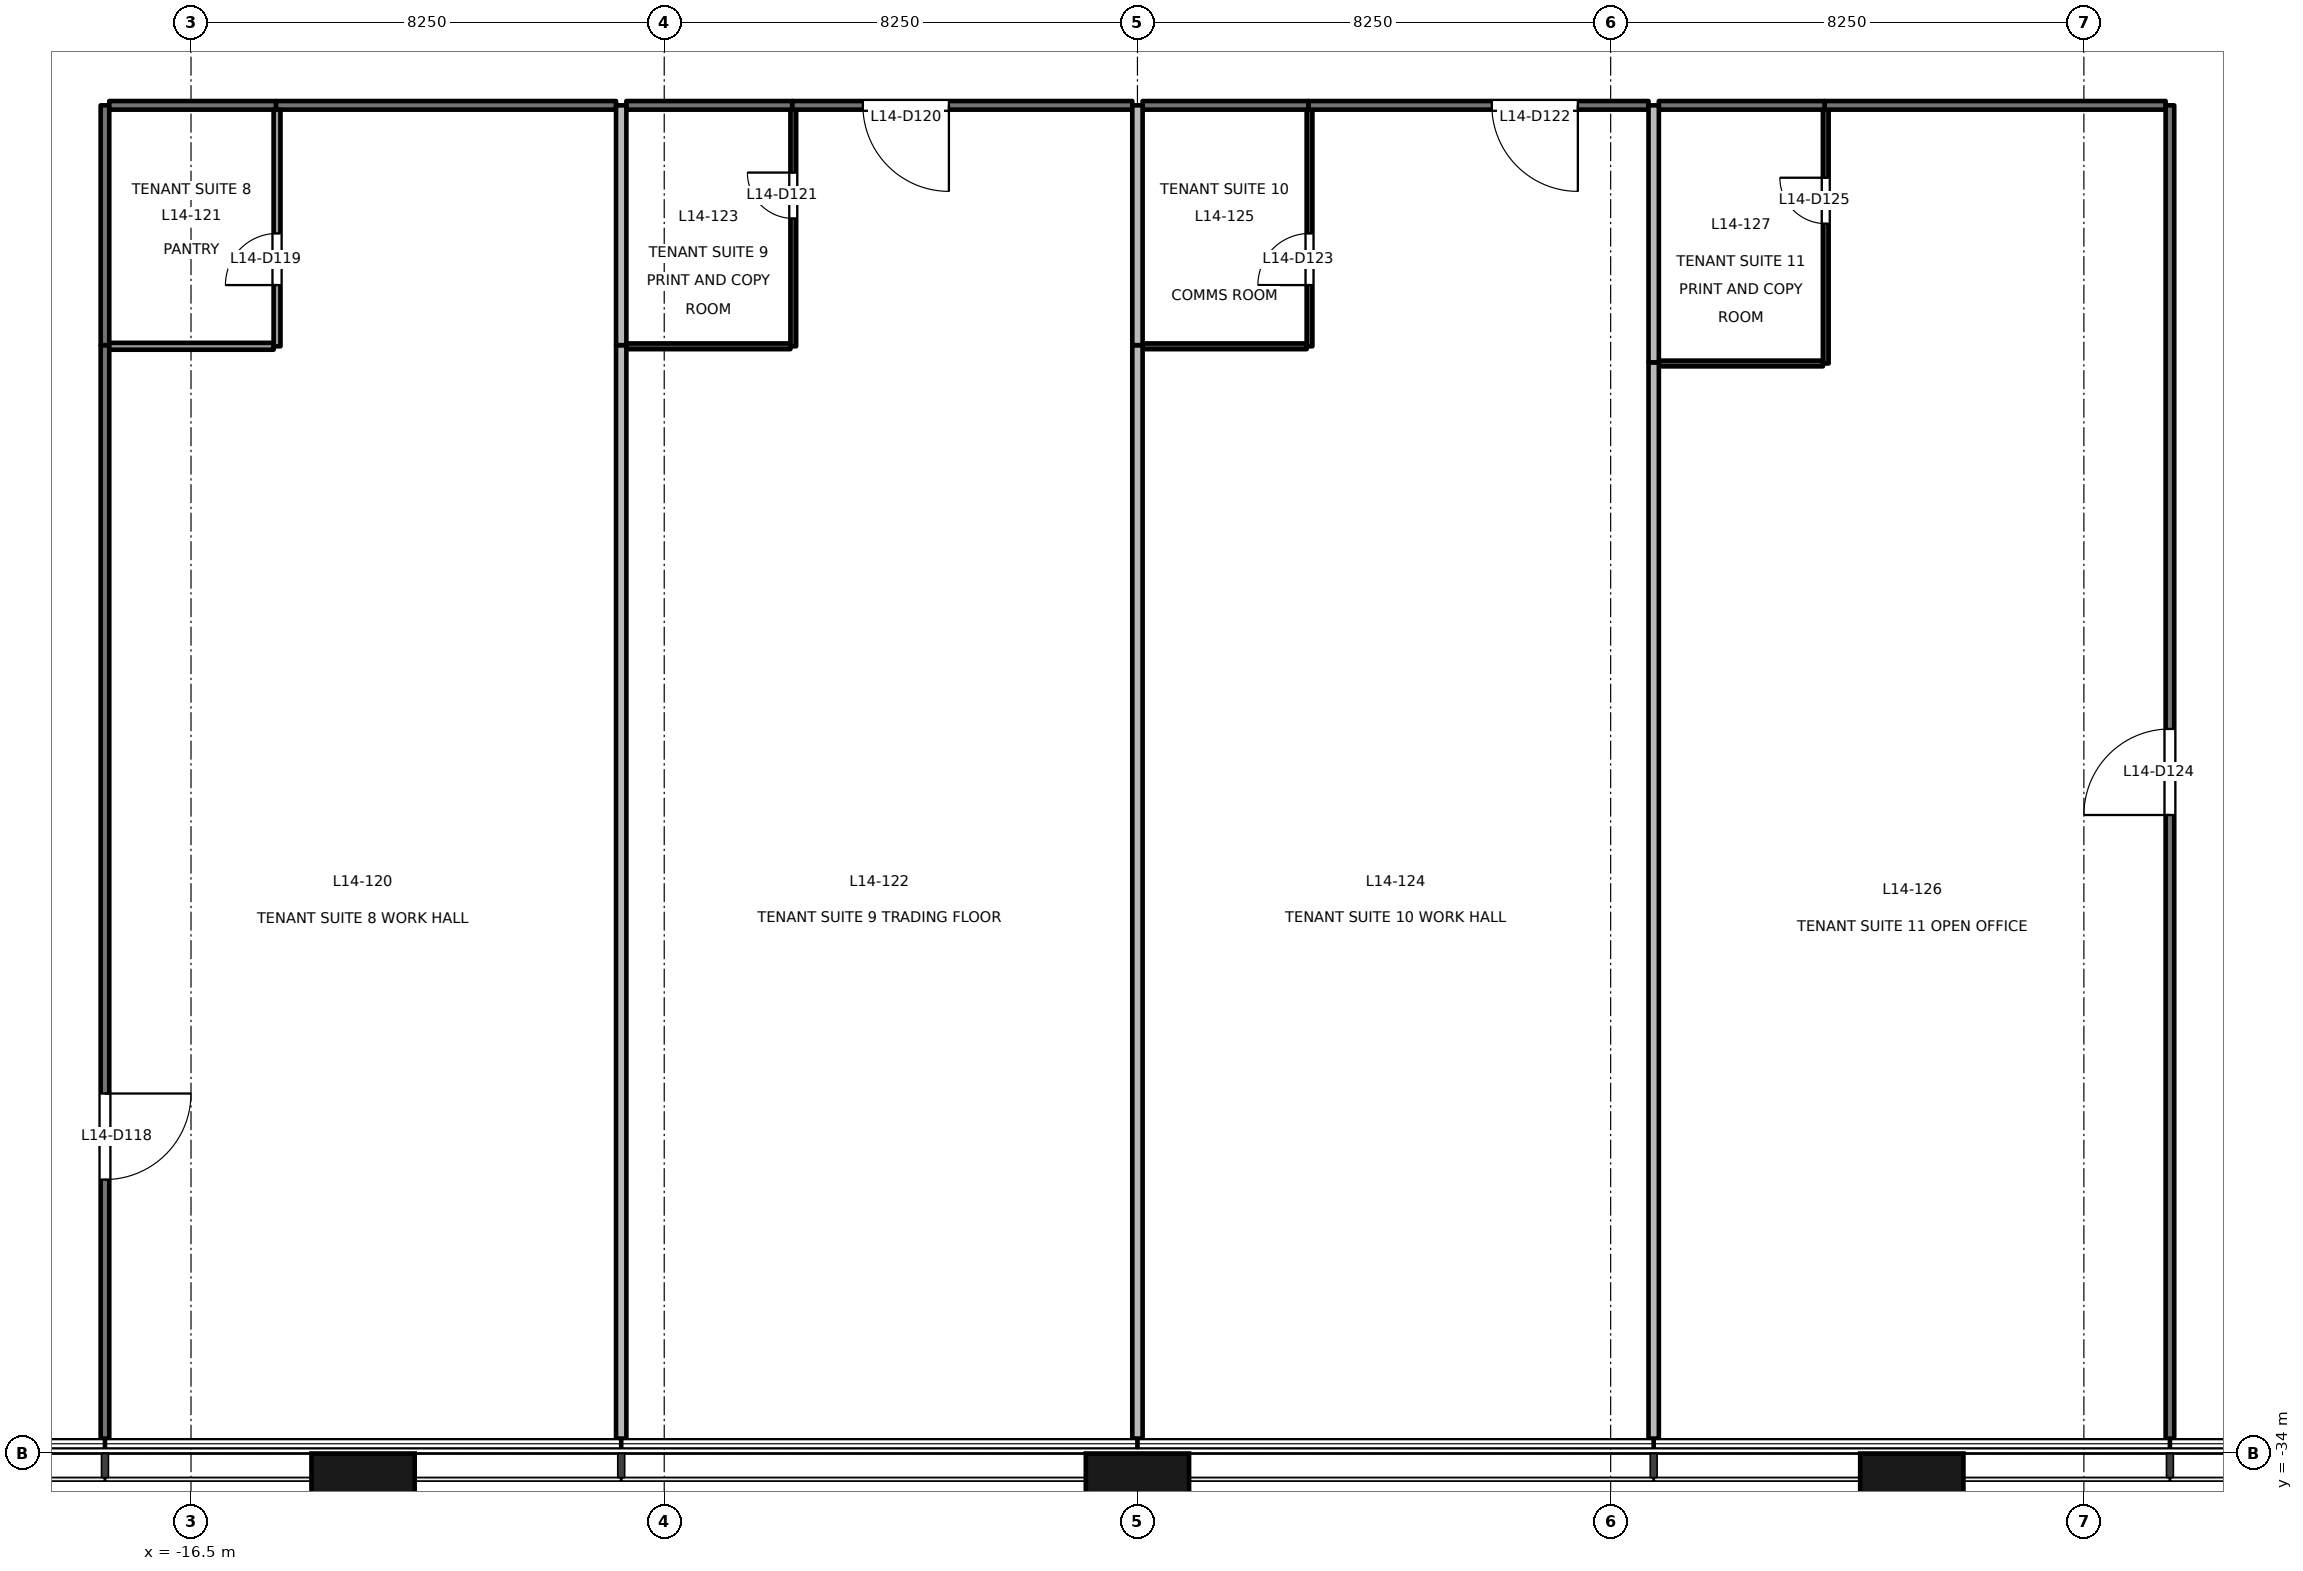
"""IFC4 building model, lengths in metres.
Left out: names, types, materials, properties, quantities, classifications, styles, units other than length and angle.
Written with IfcOpenShell. Run it as: python <this file> out.ifc"""

import sys

from ifc_helpers import new_model, si_unit, direction, frame, frame_2d, origin, origin_2d, place, context, subcontext, project, spatial, rectangle, extrude, element, fill, save


model = new_model("IFC4")
c1 = context("Model", 3, precision=1e-05, world=origin(), true_north=direction((0.0, 1.0)))
c2 = subcontext(c1, "Body", "Model", "MODEL_VIEW")
j1 = project(units=[si_unit("LENGTHUNIT", "METRE"), si_unit("PLANEANGLEUNIT", "RADIAN")], contexts=[c1])
p1 = place(None, origin())
s1 = spatial("IfcSite", under=j1, at=p1, CompositionType="ELEMENT")
p2 = place(p1, origin())
s2 = spatial("IfcBuilding", under=s1, at=p2, CompositionType="ELEMENT")
p3 = place(p2, frame((0.0, 0.0, 65.2)))
s3 = spatial("IfcBuildingStorey", under=s2, at=p3, CompositionType="ELEMENT", Elevation=65.2)
for number, where, z_axis, x_axis in (
    (1, (-13.5, -34.9, -0.2), (0.0, 0.0, 1.0), (1.0, 0.0, 0.0)),
    (2, (0.0, -34.9, -0.2), (0.0, 0.0, 1.0), (1.0, 0.0, 0.0)),
    (3, (13.5, -34.9, -0.2), (0.0, 0.0, 1.0), (1.0, 0.0, 0.0)),
):
    element("IfcColumn", number, at=place(p3, frame(where, z_axis=z_axis, x_axis=x_axis)), inside=s3, PredefinedType="COLUMN", context=c2, shape_type="SweptSolid", body=[
        extrude(rectangle(XDim=1.8, YDim=1.8, at=origin_2d()), origin(), (0.0, 0.0, 1.0), 4.1),
    ])
p4 = place(p3, frame((-18.0, -14.68, 0.0), z_axis=(0.0, 0.0, 1.0), x_axis=(0.0, -1.0, 0.0)))
e4 = element("IfcWall", 4, at=p4, inside=s3, PredefinedType="PARTITIONING", context=c2, shape_type="SweptSolid", body=[
    extrude(rectangle(XDim=19.06, YDim=0.15, at=frame_2d((9.53, 0.0))), origin(), (0.0, 0.0, 1.0), 2.5),
])
p5 = place(p4, frame((13.045, 0.0, 0.0)))
e5 = element("IfcOpeningElement", 5, at=p5, cuts=e4, PredefinedType="OPENING", context=c2, shape_type="SweptSolid", body=[
    extrude(rectangle(XDim=1.5, YDim=2.1, at=frame_2d((0.75, 1.05))), frame((0.0, 0.085, 0.0), z_axis=(0.0, -1.0, 0.0), x_axis=(1.0, 0.0, 0.0)), (0.0, 0.0, 1.0), 0.171),
])
p6 = place(p3, frame((-9.09, -10.5, 0.0), z_axis=(0.0, 0.0, 1.0), x_axis=(-1.0, 0.0, 0.0)))
e6 = element("IfcWall", 6, at=p6, inside=s3, PredefinedType="PARTITIONING", context=c2, shape_type="SweptSolid", body=[
    extrude(rectangle(XDim=5.93, YDim=0.15, at=frame_2d((2.965, 0.0))), origin(), (0.0, 0.0, 1.0), 2.9),
])
p7 = place(p3, frame((-18.0, -10.5, 0.0), z_axis=(0.0, 0.0, 1.0), x_axis=(0.0, -1.0, 0.0)))
e7 = element("IfcWall", 7, at=p7, inside=s3, PredefinedType="PARTITIONING", context=c2, shape_type="SweptSolid", body=[
    extrude(rectangle(XDim=4.18, YDim=0.15, at=frame_2d((2.09, 0.0))), origin(), (0.0, 0.0, 1.0), 2.5),
])
p8 = place(p3, frame((-15.02, -10.5, 0.0), z_axis=(0.0, 0.0, 1.0), x_axis=(-1.0, 0.0, 0.0)))
e8 = element("IfcWall", 8, at=p8, inside=s3, PredefinedType="PARTITIONING", context=c2, shape_type="SweptSolid", body=[
    extrude(rectangle(XDim=2.905, YDim=0.15, at=frame_2d((1.453, 0.0))), origin(), (0.0, 0.0, 1.0), 2.5),
])
p9 = place(p3, frame((-0.09, -10.5, 0.0), z_axis=(0.0, 0.0, 1.0), x_axis=(-1.0, 0.0, 0.0)))
e9 = element("IfcWall", 9, at=p9, inside=s3, PredefinedType="PARTITIONING", context=c2, shape_type="SweptSolid", body=[
    extrude(rectangle(XDim=5.93, YDim=0.15, at=frame_2d((2.965, 0.0))), origin(), (0.0, 0.0, 1.0), 2.9),
])
p10 = place(p9, frame((3.197, 0.0, 0.0)))
e10 = element("IfcOpeningElement", 10, at=p10, cuts=e9, PredefinedType="OPENING", context=c2, shape_type="SweptSolid", body=[
    extrude(rectangle(XDim=1.5, YDim=2.1, at=frame_2d((0.75, 1.05))), frame((0.0, 0.085, 0.0), z_axis=(0.0, -1.0, 0.0), x_axis=(1.0, 0.0, 0.0)), (0.0, 0.0, 1.0), 0.171),
])
p11 = place(p3, frame((-6.02, -10.5, 0.0), z_axis=(0.0, 0.0, 1.0), x_axis=(-1.0, 0.0, 0.0)))
e11 = element("IfcWall", 11, at=p11, inside=s3, PredefinedType="PARTITIONING", context=c2, shape_type="SweptSolid", body=[
    extrude(rectangle(XDim=2.89, YDim=0.15, at=frame_2d((1.445, 0.0))), origin(), (0.0, 0.0, 1.0), 2.9),
])
p12 = place(p3, frame((8.91, -10.5, 0.0), z_axis=(0.0, 0.0, 1.0), x_axis=(-1.0, 0.0, 0.0)))
e12 = element("IfcWall", 12, at=p12, inside=s3, PredefinedType="PARTITIONING", context=c2, shape_type="SweptSolid", body=[
    extrude(rectangle(XDim=5.93, YDim=0.15, at=frame_2d((2.965, 0.0))), origin(), (0.0, 0.0, 1.0), 2.9),
])
p13 = place(p12, frame((1.232, 0.0, 0.0)))
e13 = element("IfcOpeningElement", 13, at=p13, cuts=e12, PredefinedType="OPENING", context=c2, shape_type="SweptSolid", body=[
    extrude(rectangle(XDim=1.5, YDim=2.1, at=frame_2d((0.75, 1.05))), frame((0.0, 0.085, 0.0), z_axis=(0.0, -1.0, 0.0), x_axis=(1.0, 0.0, 0.0)), (0.0, 0.0, 1.0), 0.171),
])
p14 = place(p3, frame((2.98, -10.5, 0.0), z_axis=(0.0, 0.0, 1.0), x_axis=(-1.0, 0.0, 0.0)))
e14 = element("IfcWall", 14, at=p14, inside=s3, PredefinedType="PARTITIONING", context=c2, shape_type="SweptSolid", body=[
    extrude(rectangle(XDim=2.89, YDim=0.15, at=frame_2d((1.445, 0.0))), origin(), (0.0, 0.0, 1.0), 2.9),
])
p15 = place(p3, frame((17.925, -10.5, 0.0), z_axis=(0.0, 0.0, 1.0), x_axis=(-1.0, 0.0, 0.0)))
e15 = element("IfcWall", 15, at=p15, inside=s3, PredefinedType="PARTITIONING", context=c2, shape_type="SweptSolid", body=[
    extrude(rectangle(XDim=5.945, YDim=0.15, at=frame_2d((2.973, 0.0))), origin(), (0.0, 0.0, 1.0), 2.5),
])
p16 = place(p3, frame((18.0, -33.74, 0.0), z_axis=(0.0, 0.0, 1.0), x_axis=(0.0, 1.0, 0.0)))
e16 = element("IfcWall", 16, at=p16, inside=s3, PredefinedType="PARTITIONING", context=c2, shape_type="SweptSolid", body=[
    extrude(rectangle(XDim=23.24, YDim=0.15, at=frame_2d((11.62, 0.0))), origin(), (0.0, 0.0, 1.0), 2.5),
])
p17 = place(p16, frame((10.87, 0.0, 0.0)))
e17 = element("IfcOpeningElement", 17, at=p17, cuts=e16, PredefinedType="OPENING", context=c2, shape_type="SweptSolid", body=[
    extrude(rectangle(XDim=1.5, YDim=2.1, at=frame_2d((0.75, 1.05))), frame((0.0, 0.085, 0.0), z_axis=(0.0, -1.0, 0.0), x_axis=(1.0, 0.0, 0.0)), (0.0, 0.0, 1.0), 0.171),
])
p18 = place(p3, frame((11.98, -10.5, 0.0), z_axis=(0.0, 0.0, 1.0), x_axis=(-1.0, 0.0, 0.0)))
e18 = element("IfcWall", 18, at=p18, inside=s3, PredefinedType="PARTITIONING", context=c2, shape_type="SweptSolid", body=[
    extrude(rectangle(XDim=2.89, YDim=0.15, at=frame_2d((1.445, 0.0))), origin(), (0.0, 0.0, 1.0), 2.9),
])
p19 = place(p3, frame((-17.925, -14.7, 0.0), z_axis=(0.0, 0.0, 1.0), x_axis=(1.0, 0.0, 0.0)))
e19 = element("IfcWall", 19, at=p19, inside=s3, PredefinedType="PARTITIONING", context=c2, shape_type="SweptSolid", body=[
    extrude(rectangle(XDim=2.865, YDim=0.12, at=frame_2d((1.433, 0.0))), origin(), (0.0, 0.0, 1.0), 2.5),
])
p20 = place(p3, frame((-15.0, -14.7, 0.0), z_axis=(0.0, 0.0, 1.0), x_axis=(0.0, 1.0, 0.0)))
e20 = element("IfcWall", 20, at=p20, inside=s3, PredefinedType="PARTITIONING", context=c2, shape_type="SweptSolid", body=[
    extrude(rectangle(XDim=4.125, YDim=0.12, at=frame_2d((2.062, 0.0))), origin(), (0.0, 0.0, 1.0), 3.9),
])
p21 = place(p20, frame((1.067, 0.0, 0.0)))
e21 = element("IfcOpeningElement", 21, at=p21, cuts=e20, PredefinedType="OPENING", context=c2, shape_type="SweptSolid", body=[
    extrude(rectangle(XDim=0.9, YDim=2.1, at=frame_2d((0.45, 1.05))), frame((0.0, 0.071, 0.0), z_axis=(0.0, -1.0, 0.0), x_axis=(1.0, 0.0, 0.0)), (0.0, 0.0, 1.0), 0.141),
])
p22 = place(p3, frame((-9.0, -14.68, 0.0), z_axis=(0.0, 0.0, 1.0), x_axis=(0.0, -1.0, 0.0)))
e22 = element("IfcWall", 22, at=p22, inside=s3, PredefinedType="PARTITIONING", context=c2, shape_type="SweptSolid", body=[
    extrude(rectangle(XDim=19.06, YDim=0.18, at=frame_2d((9.53, 0.0))), origin(), (0.0, 0.0, 1.0), 2.9),
])
p23 = place(p3, frame((-9.0, -10.5, 0.0), z_axis=(0.0, 0.0, 1.0), x_axis=(0.0, -1.0, 0.0)))
e23 = element("IfcWall", 23, at=p23, inside=s3, PredefinedType="PARTITIONING", context=c2, shape_type="SweptSolid", body=[
    extrude(rectangle(XDim=4.18, YDim=0.18, at=frame_2d((2.09, 0.0))), origin(), (0.0, 0.0, 1.0), 2.9),
])
p24 = place(p3, frame((-8.91, -14.7, 0.0), z_axis=(0.0, 0.0, 1.0), x_axis=(1.0, 0.0, 0.0)))
e24 = element("IfcWall", 24, at=p24, inside=s3, PredefinedType="PARTITIONING", context=c2, shape_type="SweptSolid", body=[
    extrude(rectangle(XDim=2.86, YDim=0.1, at=frame_2d((1.43, 0.0))), origin(), (0.0, 0.0, 1.0), 2.9),
])
p25 = place(p3, frame((-6.0, -14.7, 0.0), z_axis=(0.0, 0.0, 1.0), x_axis=(0.0, 1.0, 0.0)))
e25 = element("IfcWall", 25, at=p25, inside=s3, PredefinedType="PARTITIONING", context=c2, shape_type="SweptSolid", body=[
    extrude(rectangle(XDim=4.125, YDim=0.1, at=frame_2d((2.062, 0.0))), origin(), (0.0, 0.0, 1.0), 3.9),
])
p26 = place(p25, frame((2.228, 0.0, 0.0)))
e26 = element("IfcOpeningElement", 26, at=p26, cuts=e25, PredefinedType="OPENING", context=c2, shape_type="SweptSolid", body=[
    extrude(rectangle(XDim=0.8, YDim=2.1, at=frame_2d((0.4, 1.05))), frame((0.0, 0.061, 0.0), z_axis=(0.0, -1.0, 0.0), x_axis=(1.0, 0.0, 0.0)), (0.0, 0.0, 1.0), 0.121),
])
p27 = place(p3, frame((0.0, -14.68, 0.0), z_axis=(0.0, 0.0, 1.0), x_axis=(0.0, -1.0, 0.0)))
e27 = element("IfcWall", 27, at=p27, inside=s3, PredefinedType="PARTITIONING", context=c2, shape_type="SweptSolid", body=[
    extrude(rectangle(XDim=19.06, YDim=0.18, at=frame_2d((9.53, 0.0))), origin(), (0.0, 0.0, 1.0), 2.9),
])
p28 = place(p3, frame((0.0, -10.5, 0.0), z_axis=(0.0, 0.0, 1.0), x_axis=(0.0, -1.0, 0.0)))
e28 = element("IfcWall", 28, at=p28, inside=s3, PredefinedType="PARTITIONING", context=c2, shape_type="SweptSolid", body=[
    extrude(rectangle(XDim=4.18, YDim=0.18, at=frame_2d((2.09, 0.0))), origin(), (0.0, 0.0, 1.0), 2.9),
])
p29 = place(p3, frame((0.09, -14.7, 0.0), z_axis=(0.0, 0.0, 1.0), x_axis=(1.0, 0.0, 0.0)))
e29 = element("IfcWall", 29, at=p29, inside=s3, PredefinedType="PARTITIONING", context=c2, shape_type="SweptSolid", body=[
    extrude(rectangle(XDim=2.86, YDim=0.1, at=frame_2d((1.43, 0.0))), origin(), (0.0, 0.0, 1.0), 2.9),
])
p30 = place(p3, frame((3.0, -14.7, 0.0), z_axis=(0.0, 0.0, 1.0), x_axis=(0.0, 1.0, 0.0)))
e30 = element("IfcWall", 30, at=p30, inside=s3, PredefinedType="PARTITIONING", context=c2, shape_type="SweptSolid", body=[
    extrude(rectangle(XDim=4.125, YDim=0.1, at=frame_2d((2.062, 0.0))), origin(), (0.0, 0.0, 1.0), 3.9),
])
p31 = place(p30, frame((1.067, 0.0, 0.0)))
e31 = element("IfcOpeningElement", 31, at=p31, cuts=e30, PredefinedType="OPENING", context=c2, shape_type="SweptSolid", body=[
    extrude(rectangle(XDim=0.9, YDim=2.1, at=frame_2d((0.45, 1.05))), frame((0.0, 0.061, 0.0), z_axis=(0.0, -1.0, 0.0), x_axis=(1.0, 0.0, 0.0)), (0.0, 0.0, 1.0), 0.121),
])
p32 = place(p3, frame((9.0, -14.98, 0.0), z_axis=(0.0, 0.0, 1.0), x_axis=(0.0, -1.0, 0.0)))
e32 = element("IfcWall", 32, at=p32, inside=s3, PredefinedType="PARTITIONING", context=c2, shape_type="SweptSolid", body=[
    extrude(rectangle(XDim=18.76, YDim=0.18, at=frame_2d((9.38, 0.0))), origin(), (0.0, 0.0, 1.0), 2.9),
])
p33 = place(p3, frame((9.0, -10.5, 0.0), z_axis=(0.0, 0.0, 1.0), x_axis=(0.0, -1.0, 0.0)))
e33 = element("IfcWall", 33, at=p33, inside=s3, PredefinedType="PARTITIONING", context=c2, shape_type="SweptSolid", body=[
    extrude(rectangle(XDim=4.48, YDim=0.18, at=frame_2d((2.24, 0.0))), origin(), (0.0, 0.0, 1.0), 2.9),
])
p34 = place(p3, frame((9.09, -15.0, 0.0), z_axis=(0.0, 0.0, 1.0), x_axis=(1.0, 0.0, 0.0)))
e34 = element("IfcWall", 34, at=p34, inside=s3, PredefinedType="PARTITIONING", context=c2, shape_type="SweptSolid", body=[
    extrude(rectangle(XDim=2.86, YDim=0.1, at=frame_2d((1.43, 0.0))), origin(), (0.0, 0.0, 1.0), 2.9),
])
p35 = place(p3, frame((12.0, -15.0, 0.0), z_axis=(0.0, 0.0, 1.0), x_axis=(0.0, 1.0, 0.0)))
e35 = element("IfcWall", 35, at=p35, inside=s3, PredefinedType="PARTITIONING", context=c2, shape_type="SweptSolid", body=[
    extrude(rectangle(XDim=4.425, YDim=0.1, at=frame_2d((2.212, 0.0))), origin(), (0.0, 0.0, 1.0), 3.9),
])
p36 = place(p35, frame((2.438, 0.0, 0.0)))
e36 = element("IfcOpeningElement", 36, at=p36, cuts=e35, PredefinedType="OPENING", context=c2, shape_type="SweptSolid", body=[
    extrude(rectangle(XDim=0.8, YDim=2.1, at=frame_2d((0.4, 1.05))), frame((0.0, 0.061, 0.0), z_axis=(0.0, -1.0, 0.0), x_axis=(1.0, 0.0, 0.0)), (0.0, 0.0, 1.0), 0.121),
])
p37 = place(p5, origin())
e37 = element("IfcDoor", 37, at=p37, inside=s3, OperationType="DOUBLE_DOOR_SINGLE_SWING", PredefinedType="DOOR", context=c2, shape_type="SweptSolid", body=[
    extrude(rectangle(XDim=1.5, YDim=2.1, at=frame_2d((0.75, 1.05))), frame((0.0, 0.025, 0.0), z_axis=(0.0, -1.0, 0.0), x_axis=(1.0, 0.0, 0.0)), (0.0, 0.0, 1.0), 0.05),
])
fill(e5, e37)
p38 = place(p21, origin())
e38 = element("IfcDoor", 38, at=p38, inside=s3, OperationType="SINGLE_SWING_LEFT", PredefinedType="DOOR", context=c2, shape_type="SweptSolid", body=[
    extrude(rectangle(XDim=0.9, YDim=2.1, at=frame_2d((0.45, 1.05))), frame((0.0, 0.025, 0.0), z_axis=(0.0, -1.0, 0.0), x_axis=(1.0, 0.0, 0.0)), (0.0, 0.0, 1.0), 0.05),
])
fill(e21, e38)
p39 = place(p10, origin())
e39 = element("IfcDoor", 39, at=p39, inside=s3, OperationType="DOUBLE_DOOR_SINGLE_SWING", PredefinedType="DOOR", context=c2, shape_type="SweptSolid", body=[
    extrude(rectangle(XDim=1.5, YDim=2.1, at=frame_2d((0.75, 1.05))), frame((0.0, 0.025, 0.0), z_axis=(0.0, -1.0, 0.0), x_axis=(1.0, 0.0, 0.0)), (0.0, 0.0, 1.0), 0.05),
])
fill(e10, e39)
p40 = place(p26, origin())
e40 = element("IfcDoor", 40, at=p40, inside=s3, OperationType="SINGLE_SWING_RIGHT", PredefinedType="DOOR", context=c2, shape_type="SweptSolid", body=[
    extrude(rectangle(XDim=0.8, YDim=2.1, at=frame_2d((0.4, 1.05))), frame((0.0, 0.025, 0.0), z_axis=(0.0, -1.0, 0.0), x_axis=(1.0, 0.0, 0.0)), (0.0, 0.0, 1.0), 0.05),
])
fill(e26, e40)
p41 = place(p13, origin())
e41 = element("IfcDoor", 41, at=p41, inside=s3, OperationType="DOUBLE_DOOR_SINGLE_SWING", PredefinedType="DOOR", context=c2, shape_type="SweptSolid", body=[
    extrude(rectangle(XDim=1.5, YDim=2.1, at=frame_2d((0.75, 1.05))), frame((0.0, 0.025, 0.0), z_axis=(0.0, -1.0, 0.0), x_axis=(1.0, 0.0, 0.0)), (0.0, 0.0, 1.0), 0.05),
])
fill(e13, e41)
p42 = place(p31, origin())
e42 = element("IfcDoor", 42, at=p42, inside=s3, OperationType="SINGLE_SWING_LEFT", PredefinedType="DOOR", context=c2, shape_type="SweptSolid", body=[
    extrude(rectangle(XDim=0.9, YDim=2.1, at=frame_2d((0.45, 1.05))), frame((0.0, 0.025, 0.0), z_axis=(0.0, -1.0, 0.0), x_axis=(1.0, 0.0, 0.0)), (0.0, 0.0, 1.0), 0.05),
])
fill(e31, e42)
p43 = place(p17, origin())
e43 = element("IfcDoor", 43, at=p43, inside=s3, OperationType="DOUBLE_DOOR_SINGLE_SWING", PredefinedType="DOOR", context=c2, shape_type="SweptSolid", body=[
    extrude(rectangle(XDim=1.5, YDim=2.1, at=frame_2d((0.75, 1.05))), frame((0.0, 0.025, 0.0), z_axis=(0.0, -1.0, 0.0), x_axis=(1.0, 0.0, 0.0)), (0.0, 0.0, 1.0), 0.05),
])
fill(e17, e43)
p44 = place(p36, origin())
e44 = element("IfcDoor", 44, at=p44, inside=s3, OperationType="SINGLE_SWING_RIGHT", PredefinedType="DOOR", context=c2, shape_type="SweptSolid", body=[
    extrude(rectangle(XDim=0.8, YDim=2.1, at=frame_2d((0.4, 1.05))), frame((0.0, 0.025, 0.0), z_axis=(0.0, -1.0, 0.0), x_axis=(1.0, 0.0, 0.0)), (0.0, 0.0, 1.0), 0.05),
])
fill(e36, e44)
save(model, sys.argv[1])
